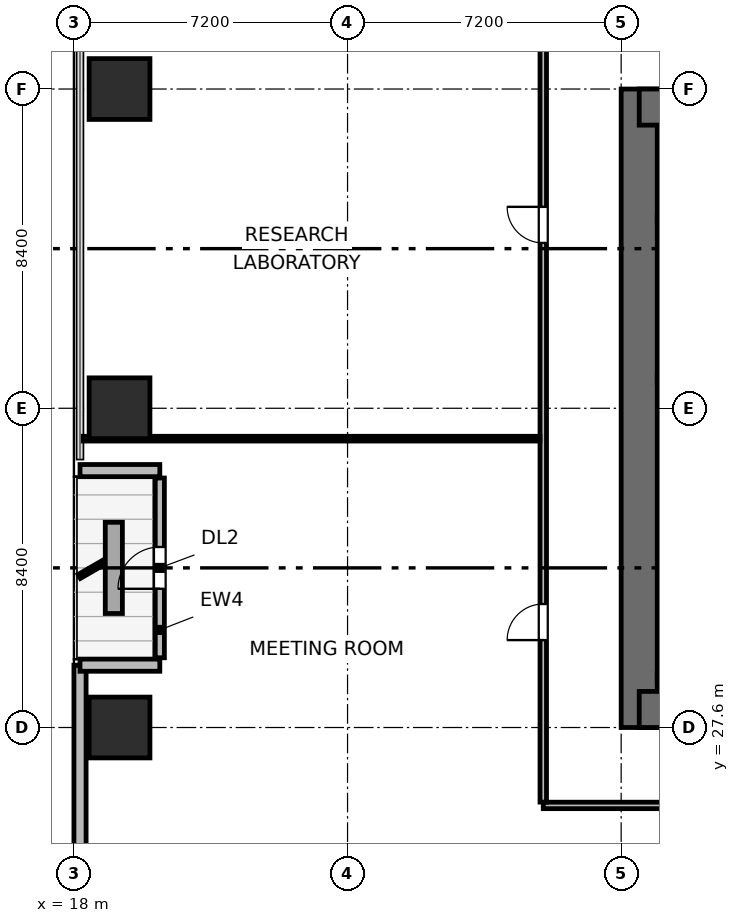
"""IFC4 building model, lengths in metres.
Left out: names, types, materials, properties, quantities, classifications, styles, units other than length and angle.
Written with IfcOpenShell. Run it as: python <this file> out.ifc"""

import sys

from ifc_helpers import new_model, si_unit, direction, frame, frame_2d, origin, origin_2d, place, context, subcontext, project, spatial, rectangle, extrude, element, fill, save


model = new_model("IFC4")
c1 = context("Model", 3, precision=1e-05, world=origin(), true_north=direction((0.0, 1.0)))
c2 = subcontext(c1, "Body", "Model", "MODEL_VIEW")
j1 = project(units=[si_unit("LENGTHUNIT", "METRE"), si_unit("PLANEANGLEUNIT", "RADIAN")], contexts=[c1])
p1 = place(None, origin())
s1 = spatial("IfcSite", under=j1, at=p1, CompositionType="ELEMENT")
p2 = place(p1, origin())
s2 = spatial("IfcBuilding", under=s1, at=p2, CompositionType="ELEMENT")
p3 = place(p2, frame((0.0, 0.0, 21.6)))
s3 = spatial("IfcBuildingStorey", under=s2, at=p3, CompositionType="ELEMENT", Elevation=21.6)
p4 = place(p3, frame((32.875, 27.6, 0.0), z_axis=(0.0, 0.0, 1.0), x_axis=(0.0, 1.0, 0.0)))
e1 = element("IfcWall", 1, at=p4, inside=s3, PredefinedType="SHEAR", context=c2, shape_type="SweptSolid", body=[
    extrude(rectangle(XDim=16.8, YDim=0.95, at=frame_2d((8.4, 0.0))), origin(), (0.0, 0.0, 1.0), 3.9),
])
p5 = place(p3, frame((32.875, 28.075, 0.0), z_axis=(0.0, 0.0, 1.0), x_axis=(1.0, 0.0, 0.0)))
e2 = element("IfcWall", 2, at=p5, inside=s3, PredefinedType="SHEAR", context=c2, shape_type="SweptSolid", body=[
    extrude(rectangle(XDim=9.05, YDim=0.95, at=frame_2d((4.525, 0.0))), origin(), (0.0, 0.0, 1.0), 3.9),
])
p6 = place(p5, frame((4.975, 0.0, 0.0)))
e3 = element("IfcOpeningElement", 3, at=p6, cuts=e2, PredefinedType="OPENING", context=c2, shape_type="SweptSolid", body=[
    extrude(rectangle(XDim=1.05, YDim=2.04, at=frame_2d((0.525, 1.02))), frame((0.0, 0.485, 0.0), z_axis=(0.0, -1.0, 0.0), x_axis=(1.0, 0.0, 0.0)), (0.0, 0.0, 1.0), 0.97),
])
p7 = place(p3, frame((32.875, 43.925, 0.0), z_axis=(0.0, 0.0, 1.0), x_axis=(1.0, 0.0, 0.0)))
e4 = element("IfcWall", 4, at=p7, inside=s3, PredefinedType="SHEAR", context=c2, shape_type="SweptSolid", body=[
    extrude(rectangle(XDim=9.05, YDim=0.95, at=frame_2d((4.525, 0.0))), origin(), (0.0, 0.0, 1.0), 3.9),
])
p8 = place(p7, frame((0.975, 0.0, 0.0)))
e5 = element("IfcOpeningElement", 5, at=p8, cuts=e4, PredefinedType="OPENING", context=c2, shape_type="SweptSolid", body=[
    extrude(rectangle(XDim=0.95, YDim=2.04, at=frame_2d((0.475, 1.02))), frame((0.0, 0.485, 0.0), z_axis=(0.0, -1.0, 0.0), x_axis=(1.0, 0.0, 0.0)), (0.0, 0.0, 1.0), 0.97),
])
p9 = place(p7, frame((4.225, 0.0, 0.0)))
e6 = element("IfcOpeningElement", 6, at=p9, cuts=e4, PredefinedType="OPENING", context=c2, shape_type="SweptSolid", body=[
    extrude(rectangle(XDim=0.9, YDim=2.02, at=frame_2d((0.45, 1.01))), frame((0.0, 0.485, 0.0), z_axis=(0.0, -1.0, 0.0), x_axis=(1.0, 0.0, 0.0)), (0.0, 0.0, 1.0), 0.97),
])
p10 = place(p7, frame((7.125, 0.0, 0.0)))
e7 = element("IfcOpeningElement", 7, at=p10, cuts=e4, PredefinedType="OPENING", context=c2, shape_type="SweptSolid", body=[
    extrude(rectangle(XDim=0.9, YDim=2.02, at=frame_2d((0.45, 1.01))), frame((0.0, 0.485, 0.0), z_axis=(0.0, -1.0, 0.0), x_axis=(1.0, 0.0, 0.0)), (0.0, 0.0, 1.0), 0.97),
])
for number, where, z_axis, x_axis in (
    (8, (33.35, 28.92, 0.0), (0.0, 0.0, 1.0), (1.0, 0.0, 0.0)),
    (9, (33.35, 36.78, 0.0), (0.0, 0.0, 1.0), (1.0, 0.0, 0.0)),
):
    element("IfcWall", number, at=place(p3, frame(where, z_axis=z_axis, x_axis=x_axis)), inside=s3, PredefinedType="SHEAR", context=c2, shape_type="SweptSolid", body=[
        extrude(rectangle(XDim=3.76, YDim=0.26, at=frame_2d((1.88, 0.0))), origin(), (0.0, 0.0, 1.0), 3.9),
    ])
for number, where, z_axis, x_axis in (
    (10, (19.2, 27.6, 0.0), (0.0, 0.0, 1.0), (1.0, 0.0, 0.0)),
    (11, (19.2, 36.0, 0.0), (0.0, 0.0, 1.0), (1.0, 0.0, 0.0)),
    (12, (19.2, 44.4, 0.0), (0.0, 0.0, 1.0), (1.0, 0.0, 0.0)),
):
    element("IfcColumn", number, at=place(p3, frame(where, z_axis=z_axis, x_axis=x_axis)), inside=s3, PredefinedType="COLUMN", context=c2, shape_type="SweptSolid", body=[
        extrude(rectangle(XDim=1.6, YDim=1.6, at=origin_2d()), origin(), (0.0, 0.0, 1.0), 3.9),
    ])
p11 = place(p3, frame((18.16, 15.021, 0.0), z_axis=(0.0, 0.0, 1.0), x_axis=(0.0, 1.0, 0.0)))
e13 = element("IfcWall", 13, at=p11, inside=s3, PredefinedType="SOLIDWALL", context=c2, shape_type="SweptSolid", body=[
    extrude(rectangle(XDim=14.219, YDim=0.32, at=frame_2d((7.109, 0.0))), origin(), (0.0, 0.0, 1.0), 3.64),
])
p12 = place(p3, frame((18.16, 29.24, 0.0), z_axis=(0.0, 0.0, 1.0), x_axis=(1.0, 0.0, 0.0)))
e14 = element("IfcWall", 14, at=p12, inside=s3, PredefinedType="SOLIDWALL", context=c2, shape_type="SweptSolid", body=[
    extrude(rectangle(XDim=2.1, YDim=0.32, at=frame_2d((1.05, 0.0))), origin(), (0.0, 0.0, 1.0), 2.875),
])
p13 = place(p3, frame((20.26, 29.435, 0.0), z_axis=(0.0, 0.0, 1.0), x_axis=(0.0, 1.0, 0.0)))
e15 = element("IfcWall", 15, at=p13, inside=s3, PredefinedType="SOLIDWALL", context=c2, shape_type="SweptSolid", body=[
    extrude(rectangle(XDim=4.73, YDim=0.24, at=frame_2d((2.365, 0.0))), origin(), (0.0, 0.0, 1.0), 3.162),
])
p14 = place(p13, frame((1.815, 0.0, 0.0)))
e16 = element("IfcOpeningElement", 16, at=p14, cuts=e15, PredefinedType="OPENING", context=c2, shape_type="SweptSolid", body=[
    extrude(rectangle(XDim=1.1, YDim=2.04, at=frame_2d((0.55, 1.02))), frame((0.0, 0.13, 0.0), z_axis=(0.0, -1.0, 0.0), x_axis=(1.0, 0.0, 0.0)), (0.0, 0.0, 1.0), 0.26),
])
p15 = place(p3, frame((20.26, 34.36, 0.0), z_axis=(0.0, 0.0, 1.0), x_axis=(-1.0, 0.0, 0.0)))
e17 = element("IfcWall", 17, at=p15, inside=s3, PredefinedType="SOLIDWALL", context=c2, shape_type="SweptSolid", body=[
    extrude(rectangle(XDim=2.1, YDim=0.32, at=frame_2d((1.05, 0.0))), origin(), (0.0, 0.0, 1.0), 2.875),
])
p16 = place(p3, frame((33.35, 41.0, 0.0), z_axis=(0.0, 0.0, 1.0), x_axis=(1.0, 0.0, 0.0)))
e18 = element("IfcWall", 18, at=p16, inside=s3, PredefinedType="PLUMBINGWALL", context=c2, shape_type="SweptSolid", body=[
    extrude(rectangle(XDim=8.1, YDim=0.19, at=frame_2d((4.05, 0.0))), origin(), (0.0, 0.0, 1.0), 3.64),
])
p17 = place(p3, frame((33.36, 39.5, 0.0), z_axis=(0.0, 0.0, 1.0), x_axis=(1.0, 0.0, 0.0)))
e19 = element("IfcWall", 19, at=p17, inside=s3, PredefinedType="PARTITIONING", context=c2, shape_type="SweptSolid", body=[
    extrude(rectangle(XDim=1.86, YDim=0.21, at=frame_2d((0.93, 0.0))), origin(), (0.0, 0.0, 1.0), 3.64),
])
p18 = place(p3, frame((30.35, 25.55, 0.0), z_axis=(0.0, 0.0, 1.0), x_axis=(1.0, 0.0, 0.0)))
e20 = element("IfcWall", 20, at=p18, inside=s3, PredefinedType="PARTITIONING", context=c2, shape_type="SweptSolid", body=[
    extrude(rectangle(XDim=35.3, YDim=0.17, at=frame_2d((17.65, 0.0))), origin(), (0.0, 0.0, 1.0), 3.64),
])
p19 = place(p18, frame((8.35, 0.0, 0.0)))
e21 = element("IfcOpeningElement", 21, at=p19, cuts=e20, PredefinedType="OPENING", context=c2, shape_type="SweptSolid", body=[
    extrude(rectangle(XDim=0.95, YDim=2.04, at=frame_2d((0.475, 1.02))), frame((0.0, 0.095, 0.0), z_axis=(0.0, -1.0, 0.0), x_axis=(1.0, 0.0, 0.0)), (0.0, 0.0, 1.0), 0.19),
])
p20 = place(p18, frame((26.0, 0.0, 0.0)))
e22 = element("IfcOpeningElement", 22, at=p20, cuts=e20, PredefinedType="OPENING", context=c2, shape_type="SweptSolid", body=[
    extrude(rectangle(XDim=0.95, YDim=2.04, at=frame_2d((0.475, 1.02))), frame((0.0, 0.095, 0.0), z_axis=(0.0, -1.0, 0.0), x_axis=(1.0, 0.0, 0.0)), (0.0, 0.0, 1.0), 0.19),
])
p21 = place(p3, frame((30.35, 25.637, 0.0), z_axis=(0.0, 0.0, 1.0), x_axis=(0.0, 1.0, 0.0)))
e23 = element("IfcWall", 23, at=p21, inside=s3, PredefinedType="PARTITIONING", context=c2, shape_type="SweptSolid", body=[
    extrude(rectangle(XDim=20.726, YDim=0.17, at=frame_2d((10.363, 0.0))), origin(), (0.0, 0.0, 1.0), 3.64),
])
p22 = place(p21, frame((4.263, 0.0, 0.0)))
e24 = element("IfcOpeningElement", 24, at=p22, cuts=e23, PredefinedType="OPENING", context=c2, shape_type="SweptSolid", body=[
    extrude(rectangle(XDim=0.95, YDim=2.04, at=frame_2d((0.475, 1.02))), frame((0.0, 0.095, 0.0), z_axis=(0.0, -1.0, 0.0), x_axis=(1.0, 0.0, 0.0)), (0.0, 0.0, 1.0), 0.19),
])
p23 = place(p21, frame((14.713, 0.0, 0.0)))
e25 = element("IfcOpeningElement", 25, at=p23, cuts=e23, PredefinedType="OPENING", context=c2, shape_type="SweptSolid", body=[
    extrude(rectangle(XDim=0.95, YDim=2.04, at=frame_2d((0.475, 1.02))), frame((0.0, 0.095, 0.0), z_axis=(0.0, -1.0, 0.0), x_axis=(1.0, 0.0, 0.0)), (0.0, 0.0, 1.0), 0.19),
])
p24 = place(p3, frame((18.245, 35.2, 0.0), z_axis=(0.0, 0.0, 1.0), x_axis=(1.0, 0.0, 0.0)))
e26 = element("IfcWall", 26, at=p24, inside=s3, PredefinedType="PARTITIONING", context=c2, shape_type="SweptSolid", body=[
    extrude(rectangle(XDim=12.018, YDim=0.125, at=frame_2d((6.009, 0.0))), origin(), (0.0, 0.0, 1.0), 3.64),
])
p25 = place(p14, origin())
e27 = element("IfcDoor", 27, at=p25, inside=s3, OperationType="SINGLE_SWING_LEFT", PredefinedType="DOOR", context=c2, shape_type="SweptSolid", body=[
    extrude(rectangle(XDim=1.1, YDim=2.04, at=frame_2d((0.55, 1.02))), frame((0.0, 0.025, 0.0), z_axis=(0.0, -1.0, 0.0), x_axis=(1.0, 0.0, 0.0)), (0.0, 0.0, 1.0), 0.05),
])
fill(e16, e27)
p26 = place(p22, origin())
e28 = element("IfcDoor", 28, at=p26, inside=s3, OperationType="SINGLE_SWING_LEFT", PredefinedType="DOOR", context=c2, shape_type="SweptSolid", body=[
    extrude(rectangle(XDim=0.95, YDim=2.04, at=frame_2d((0.475, 1.02))), frame((0.0, 0.025, 0.0), z_axis=(0.0, -1.0, 0.0), x_axis=(1.0, 0.0, 0.0)), (0.0, 0.0, 1.0), 0.05),
])
fill(e24, e28)
p27 = place(p23, origin())
e29 = element("IfcDoor", 29, at=p27, inside=s3, OperationType="SINGLE_SWING_RIGHT", PredefinedType="DOOR", context=c2, shape_type="SweptSolid", body=[
    extrude(rectangle(XDim=0.95, YDim=2.04, at=frame_2d((0.475, 1.02))), frame((0.0, 0.025, 0.0), z_axis=(0.0, -1.0, 0.0), x_axis=(1.0, 0.0, 0.0)), (0.0, 0.0, 1.0), 0.05),
])
fill(e25, e29)
save(model, sys.argv[1])
